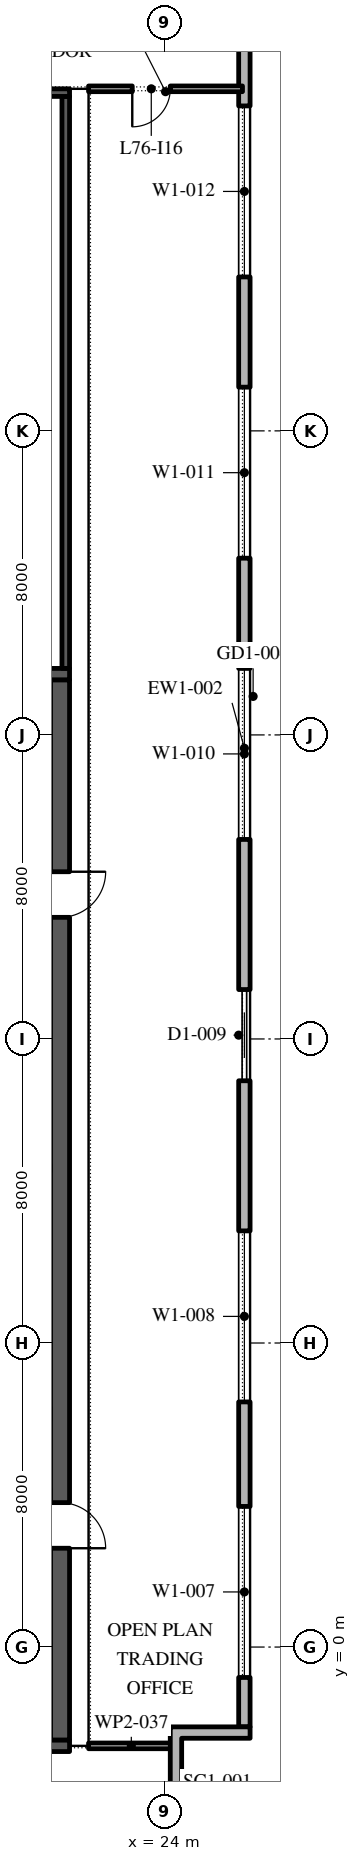
"""IFC4 building model, lengths in metres.
Left out: names, types, materials, properties, quantities, classifications, styles, units other than length and angle.
Written with IfcOpenShell. Run it as: python <this file> out.ifc"""

import sys

from ifc_helpers import new_model, si_unit, direction, frame, frame_2d, origin, place, context, subcontext, project, spatial, polyline, rectangle, outline, extrude, element, fill, save


model = new_model("IFC4")
c1 = context("Model", 3, precision=1e-05, world=origin(), true_north=direction((0.0, 1.0)))
c2 = subcontext(c1, "Body", "Model", "MODEL_VIEW")
j1 = project(units=[si_unit("LENGTHUNIT", "METRE"), si_unit("PLANEANGLEUNIT", "RADIAN")], contexts=[c1])
p1 = place(None, origin())
s1 = spatial("IfcSite", under=j1, at=p1, CompositionType="ELEMENT")
p2 = place(p1, origin())
s2 = spatial("IfcBuilding", under=s1, at=p2, CompositionType="ELEMENT")
p3 = place(p2, frame((0.0, 0.0, 346.8)))
s3 = spatial("IfcBuildingStorey", under=s2, at=p3, CompositionType="ELEMENT", Elevation=346.8)
p4 = place(p3, frame((26.1, -2.1, 0.0), z_axis=(0.0, 0.0, 1.0), x_axis=(0.0, 1.0, 0.0)))
e1 = element("IfcWall", 1, at=p4, inside=s3, PredefinedType="STANDARD", context=c2, shape_type="SweptSolid", body=[
    extrude(rectangle(XDim=51.5, YDim=0.3, at=frame_2d((25.75, 0.0))), origin(), (0.0, 0.0, 1.0), 4.0),
])
p5 = place(p4, frame((1.3, 0.0, 0.45)))
e2 = element("IfcOpeningElement", 2, at=p5, cuts=e1, PredefinedType="OPENING", context=c2, shape_type="SweptSolid", body=[
    extrude(rectangle(XDim=4.5, YDim=3.05, at=frame_2d((2.25, 1.525))), frame((0.0, 0.16, 0.0), z_axis=(0.0, -1.0, 0.0), x_axis=(1.0, 0.0, 0.0)), (0.0, 0.0, 1.0), 0.32),
])
p6 = place(p4, frame((8.55, 0.0, 0.45)))
e3 = element("IfcOpeningElement", 3, at=p6, cuts=e1, PredefinedType="OPENING", context=c2, shape_type="SweptSolid", body=[
    extrude(rectangle(XDim=4.5, YDim=3.05, at=frame_2d((2.25, 1.525))), frame((0.0, 0.16, 0.0), z_axis=(0.0, -1.0, 0.0), x_axis=(1.0, 0.0, 0.0)), (0.0, 0.0, 1.0), 0.32),
])
p7 = place(p4, frame((17.0, 0.0, 0.0)))
e4 = element("IfcOpeningElement", 4, at=p7, cuts=e1, PredefinedType="OPENING", context=c2, shape_type="SweptSolid", body=[
    extrude(rectangle(XDim=2.4, YDim=3.5, at=frame_2d((1.2, 1.75))), frame((0.0, 0.16, 0.0), z_axis=(0.0, -1.0, 0.0), x_axis=(1.0, 0.0, 0.0)), (0.0, 0.0, 1.0), 0.32),
])
p8 = place(p4, frame((23.35, 0.0, 0.45)))
e5 = element("IfcOpeningElement", 5, at=p8, cuts=e1, PredefinedType="OPENING", context=c2, shape_type="SweptSolid", body=[
    extrude(rectangle(XDim=4.5, YDim=3.05, at=frame_2d((2.25, 1.525))), frame((0.0, 0.16, 0.0), z_axis=(0.0, -1.0, 0.0), x_axis=(1.0, 0.0, 0.0)), (0.0, 0.0, 1.0), 0.32),
])
p9 = place(p4, frame((30.75, 0.0, 0.45)))
e6 = element("IfcOpeningElement", 6, at=p9, cuts=e1, PredefinedType="OPENING", context=c2, shape_type="SweptSolid", body=[
    extrude(rectangle(XDim=4.5, YDim=3.05, at=frame_2d((2.25, 1.525))), frame((0.0, 0.16, 0.0), z_axis=(0.0, -1.0, 0.0), x_axis=(1.0, 0.0, 0.0)), (0.0, 0.0, 1.0), 0.32),
])
p10 = place(p4, frame((38.15, 0.0, 0.45)))
e7 = element("IfcOpeningElement", 7, at=p10, cuts=e1, PredefinedType="OPENING", context=c2, shape_type="SweptSolid", body=[
    extrude(rectangle(XDim=4.5, YDim=3.05, at=frame_2d((2.25, 1.525))), frame((0.0, 0.16, 0.0), z_axis=(0.0, -1.0, 0.0), x_axis=(1.0, 0.0, 0.0)), (0.0, 0.0, 1.0), 0.32),
])
p11 = place(p4, frame((46.6, 0.0, 0.0)))
e8 = element("IfcOpeningElement", 8, at=p11, cuts=e1, PredefinedType="OPENING", context=c2, shape_type="SweptSolid", body=[
    extrude(rectangle(XDim=2.4, YDim=3.5, at=frame_2d((1.2, 1.75))), frame((0.0, 0.16, 0.0), z_axis=(0.0, -1.0, 0.0), x_axis=(1.0, 0.0, 0.0)), (0.0, 0.0, 1.0), 0.32),
])
p12 = place(p3, origin())
e9 = element("IfcWall", 9, at=p12, inside=s3, PredefinedType="STANDARD", context=c2, shape_type="SweptSolid", body=[
    extrude(outline(polyline([(24.15, -3.9), (24.15, -2.1), (26.25, -2.1), (26.25, -2.4), (24.45, -2.4), (24.45, -4.2), (22.65, -4.2), (22.65, -5.7), (22.35, -5.7), (22.35, -3.9), (24.15, -3.9)])), origin(), (0.0, 0.0, 1.0), 4.0),
])
p13 = place(p3, frame((21.25, -2.45, 0.0), z_axis=(0.0, 0.0, 1.0), x_axis=(0.0, 1.0, 0.0)))
e10 = element("IfcWall", 10, at=p13, inside=s3, PredefinedType="SHEAR", context=c2, shape_type="SweptSolid", body=[
    extrude(rectangle(XDim=27.9, YDim=0.5, at=frame_2d((13.95, 0.0))), origin(), (0.0, 0.0, 1.0), 4.0),
])
p14 = place(p13, frame((5.05, 0.0, 0.0)))
e11 = element("IfcOpeningElement", 11, at=p14, cuts=e10, PredefinedType="OPENING", context=c2, shape_type="SweptSolid", body=[
    extrude(rectangle(XDim=1.2, YDim=2.1, at=frame_2d((0.6, 1.05))), frame((0.0, 0.26, 0.0), z_axis=(0.0, -1.0, 0.0), x_axis=(1.0, 0.0, 0.0)), (0.0, 0.0, 1.0), 0.52),
])
p15 = place(p13, frame((21.65, 0.0, 0.0)))
e12 = element("IfcOpeningElement", 12, at=p15, cuts=e10, PredefinedType="OPENING", context=c2, shape_type="SweptSolid", body=[
    extrude(rectangle(XDim=1.2, YDim=2.1, at=frame_2d((0.6, 1.05))), frame((0.0, 0.26, 0.0), z_axis=(0.0, -1.0, 0.0), x_axis=(1.0, 0.0, 0.0)), (0.0, 0.0, 1.0), 0.52),
])
for number, where, z_axis, x_axis in (
    (13, (10.5, -2.6, 0.0), (0.0, 0.0, 1.0), (1.0, 0.0, 0.0)),
    (14, (10.5, 25.6, 0.0), (0.0, 0.0, 1.0), (1.0, 0.0, 0.0)),
):
    element("IfcWall", number, at=place(p3, frame(where, z_axis=z_axis, x_axis=x_axis)), inside=s3, PredefinedType="SHEAR", context=c2, shape_type="SweptSolid", body=[
        extrude(rectangle(XDim=11.0, YDim=0.3, at=frame_2d((5.5, 0.0))), origin(), (0.0, 0.0, 1.0), 4.0),
    ])
p16 = place(p3, frame((21.4, 25.75, 0.0), z_axis=(0.0, 0.0, 1.0), x_axis=(0.0, 1.0, 0.0)))
e15 = element("IfcWall", 15, at=p16, inside=s3, PredefinedType="SHEAR", context=c2, shape_type="SweptSolid", body=[
    extrude(rectangle(XDim=15.05, YDim=0.2, at=frame_2d((7.525, 0.0))), origin(), (0.0, 0.0, 1.0), 4.0),
])
p17 = place(p3, frame((10.5, 40.9, 0.0), z_axis=(0.0, 0.0, 1.0), x_axis=(1.0, 0.0, 0.0)))
e16 = element("IfcWall", 16, at=p17, inside=s3, PredefinedType="SHEAR", context=c2, shape_type="SweptSolid", body=[
    extrude(rectangle(XDim=11.0, YDim=0.2, at=frame_2d((5.5, 0.0))), origin(), (0.0, 0.0, 1.0), 4.0),
])
p18 = place(p3, frame((22.0, -2.6, 0.0), z_axis=(0.0, 0.0, 1.0), x_axis=(1.0, 0.0, 0.0)))
e17 = element("IfcWall", 17, at=p18, inside=s3, PredefinedType="PARTITIONING", context=c2, shape_type="SweptSolid", body=[
    extrude(rectangle(XDim=2.25, YDim=0.15, at=frame_2d((1.125, 0.0))), origin(), (0.0, 0.0, 1.0), 4.0),
])
p19 = place(p3, frame((26.05, 41.0, 0.0), z_axis=(0.0, 0.0, 1.0), x_axis=(-1.0, 0.0, 0.0)))
e18 = element("IfcWall", 18, at=p19, inside=s3, PredefinedType="PARTITIONING", context=c2, shape_type="SweptSolid", body=[
    extrude(rectangle(XDim=4.05, YDim=0.15, at=frame_2d((2.025, 0.0))), origin(), (0.0, 0.0, 1.0), 4.0),
])
p20 = place(p19, frame((1.9, 0.0, 0.0)))
e19 = element("IfcOpeningElement", 19, at=p20, cuts=e18, PredefinedType="OPENING", context=c2, shape_type="SweptSolid", body=[
    extrude(rectangle(XDim=1.0, YDim=2.1, at=frame_2d((0.5, 1.05))), frame((0.0, 0.085, 0.0), z_axis=(0.0, -1.0, 0.0), x_axis=(1.0, 0.0, 0.0)), (0.0, 0.0, 1.0), 0.17),
])
p21 = place(p5, origin())
e20 = element("IfcWindow", 20, at=p21, inside=s3, PartitioningType="DOUBLE_PANEL_VERTICAL", PredefinedType="WINDOW", context=c2, shape_type="SweptSolid", body=[
    extrude(rectangle(XDim=4.5, YDim=3.05, at=frame_2d((2.25, 1.525))), frame((0.0, 0.03, 0.0), z_axis=(0.0, -1.0, 0.0), x_axis=(1.0, 0.0, 0.0)), (0.0, 0.0, 1.0), 0.06),
])
fill(e2, e20)
p22 = place(p6, origin())
e21 = element("IfcWindow", 21, at=p22, inside=s3, PartitioningType="DOUBLE_PANEL_VERTICAL", PredefinedType="WINDOW", context=c2, shape_type="SweptSolid", body=[
    extrude(rectangle(XDim=4.5, YDim=3.05, at=frame_2d((2.25, 1.525))), frame((0.0, 0.03, 0.0), z_axis=(0.0, -1.0, 0.0), x_axis=(1.0, 0.0, 0.0)), (0.0, 0.0, 1.0), 0.06),
])
fill(e3, e21)
p23 = place(p7, origin())
e22 = element("IfcDoor", 22, at=p23, inside=s3, OperationType="DOUBLE_DOOR_SLIDING", PredefinedType="DOOR", context=c2, shape_type="SweptSolid", body=[
    extrude(rectangle(XDim=2.4, YDim=3.5, at=frame_2d((1.2, 1.75))), frame((0.0, 0.025, 0.0), z_axis=(0.0, -1.0, 0.0), x_axis=(1.0, 0.0, 0.0)), (0.0, 0.0, 1.0), 0.05),
])
fill(e4, e22)
p24 = place(p8, origin())
e23 = element("IfcWindow", 23, at=p24, inside=s3, PartitioningType="DOUBLE_PANEL_VERTICAL", PredefinedType="WINDOW", context=c2, shape_type="SweptSolid", body=[
    extrude(rectangle(XDim=4.5, YDim=3.05, at=frame_2d((2.25, 1.525))), frame((0.0, 0.03, 0.0), z_axis=(0.0, -1.0, 0.0), x_axis=(1.0, 0.0, 0.0)), (0.0, 0.0, 1.0), 0.06),
])
fill(e5, e23)
p25 = place(p9, origin())
e24 = element("IfcWindow", 24, at=p25, inside=s3, PartitioningType="DOUBLE_PANEL_VERTICAL", PredefinedType="WINDOW", context=c2, shape_type="SweptSolid", body=[
    extrude(rectangle(XDim=4.5, YDim=3.05, at=frame_2d((2.25, 1.525))), frame((0.0, 0.03, 0.0), z_axis=(0.0, -1.0, 0.0), x_axis=(1.0, 0.0, 0.0)), (0.0, 0.0, 1.0), 0.06),
])
fill(e6, e24)
p26 = place(p10, origin())
e25 = element("IfcWindow", 25, at=p26, inside=s3, PartitioningType="DOUBLE_PANEL_VERTICAL", PredefinedType="WINDOW", context=c2, shape_type="SweptSolid", body=[
    extrude(rectangle(XDim=4.5, YDim=3.05, at=frame_2d((2.25, 1.525))), frame((0.0, 0.03, 0.0), z_axis=(0.0, -1.0, 0.0), x_axis=(1.0, 0.0, 0.0)), (0.0, 0.0, 1.0), 0.06),
])
fill(e7, e25)
p27 = place(p14, frame((1.2, 0.0, 0.0), z_axis=(0.0, 0.0, 1.0), x_axis=(-1.0, 0.0, 0.0)))
e26 = element("IfcDoor", 26, at=p27, inside=s3, OperationType="SINGLE_SWING_LEFT", PredefinedType="DOOR", context=c2, shape_type="SweptSolid", body=[
    extrude(rectangle(XDim=1.2, YDim=2.1, at=frame_2d((0.6, 1.05))), frame((0.0, 0.025, 0.0), z_axis=(0.0, -1.0, 0.0), x_axis=(1.0, 0.0, 0.0)), (0.0, 0.0, 1.0), 0.05),
])
fill(e11, e26)
p28 = place(p15, frame((1.2, 0.0, 0.0), z_axis=(0.0, 0.0, 1.0), x_axis=(-1.0, 0.0, 0.0)))
e27 = element("IfcDoor", 27, at=p28, inside=s3, OperationType="SINGLE_SWING_RIGHT", PredefinedType="DOOR", context=c2, shape_type="SweptSolid", body=[
    extrude(rectangle(XDim=1.2, YDim=2.1, at=frame_2d((0.6, 1.05))), frame((0.0, 0.025, 0.0), z_axis=(0.0, -1.0, 0.0), x_axis=(1.0, 0.0, 0.0)), (0.0, 0.0, 1.0), 0.05),
])
fill(e12, e27)
p29 = place(p20, origin())
e28 = element("IfcDoor", 28, at=p29, inside=s3, OperationType="SINGLE_SWING_LEFT", PredefinedType="DOOR", context=c2, shape_type="SweptSolid", body=[
    extrude(rectangle(XDim=1.0, YDim=2.1, at=frame_2d((0.5, 1.05))), frame((0.0, 0.025, 0.0), z_axis=(0.0, -1.0, 0.0), x_axis=(1.0, 0.0, 0.0)), (0.0, 0.0, 1.0), 0.05),
])
fill(e19, e28)
save(model, sys.argv[1])
